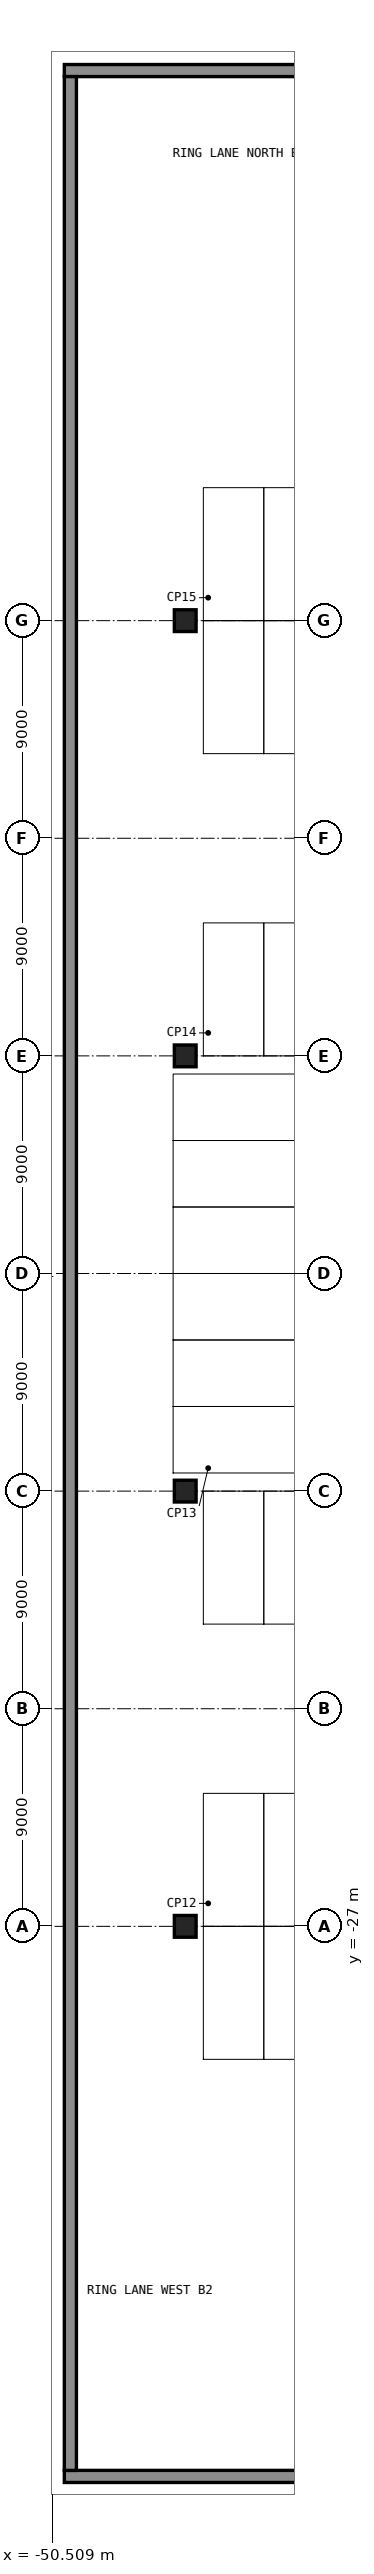
"""IFC4 building model, lengths in metres.
Left out: names, types, materials, properties, quantities, classifications, styles, units other than length and angle.
Written with IfcOpenShell. Run it as: python <this file> out.ifc"""

import sys

from ifc_helpers import new_model, si_unit, direction, frame, frame_2d, origin, origin_2d, place, context, subcontext, project, spatial, rectangle, extrude, element, save


model = new_model("IFC4")
c1 = context("Model", 3, precision=1e-05, world=origin(), true_north=direction((0.0, 1.0)))
c2 = subcontext(c1, "Body", "Model", "MODEL_VIEW")
j1 = project(units=[si_unit("LENGTHUNIT", "METRE"), si_unit("PLANEANGLEUNIT", "RADIAN")], contexts=[c1])
p1 = place(None, origin())
s1 = spatial("IfcSite", under=j1, at=p1, CompositionType="ELEMENT")
p2 = place(p1, origin())
s2 = spatial("IfcBuilding", under=s1, at=p2, CompositionType="ELEMENT")
p3 = place(p2, frame((0.0, 0.0, -8.7)))
s3 = spatial("IfcBuildingStorey", under=s2, at=p3, CompositionType="ELEMENT", Elevation=-8.7)
for number, where, z_axis, x_axis in (
    (1, (-50.0, 49.75, -0.3), (0.0, 0.0, 1.0), (1.0, 0.0, 0.0)),
    (2, (-50.0, -49.75, -0.3), (0.0, 0.0, 1.0), (1.0, 0.0, 0.0)),
):
    element("IfcWall", number, at=place(p3, frame(where, z_axis=z_axis, x_axis=x_axis)), inside=s3, PredefinedType="SOLIDWALL", context=c2, shape_type="SweptSolid", body=[
        extrude(rectangle(XDim=100.0, YDim=0.5, at=frame_2d((50.0, 0.0))), origin(), (0.0, 0.0, 1.0), 4.2),
    ])
p4 = place(p3, frame((-49.75, -49.5, -0.3), z_axis=(0.0, 0.0, 1.0), x_axis=(0.0, 1.0, 0.0)))
e3 = element("IfcWall", 3, at=p4, inside=s3, PredefinedType="SOLIDWALL", context=c2, shape_type="SweptSolid", body=[
    extrude(rectangle(XDim=99.0, YDim=0.5, at=frame_2d((49.5, 0.0))), origin(), (0.0, 0.0, 1.0), 4.2),
])
for number, where, z_axis, x_axis in (
    (4, (-45.0, -27.0, -0.3), (0.0, 0.0, 1.0), (1.0, 0.0, 0.0)),
    (5, (-45.0, -9.0, -0.3), (0.0, 0.0, 1.0), (1.0, 0.0, 0.0)),
    (6, (-45.0, 9.0, -0.3), (0.0, 0.0, 1.0), (1.0, 0.0, 0.0)),
    (7, (-45.0, 27.0, -0.3), (0.0, 0.0, 1.0), (1.0, 0.0, 0.0)),
):
    element("IfcColumn", number, at=place(p3, frame(where, z_axis=z_axis, x_axis=x_axis)), inside=s3, PredefinedType="COLUMN", context=c2, shape_type="SweptSolid", body=[
        extrude(rectangle(XDim=0.9, YDim=0.9, at=origin_2d()), origin(), (0.0, 0.0, 1.0), 4.2),
    ])
save(model, sys.argv[1])
